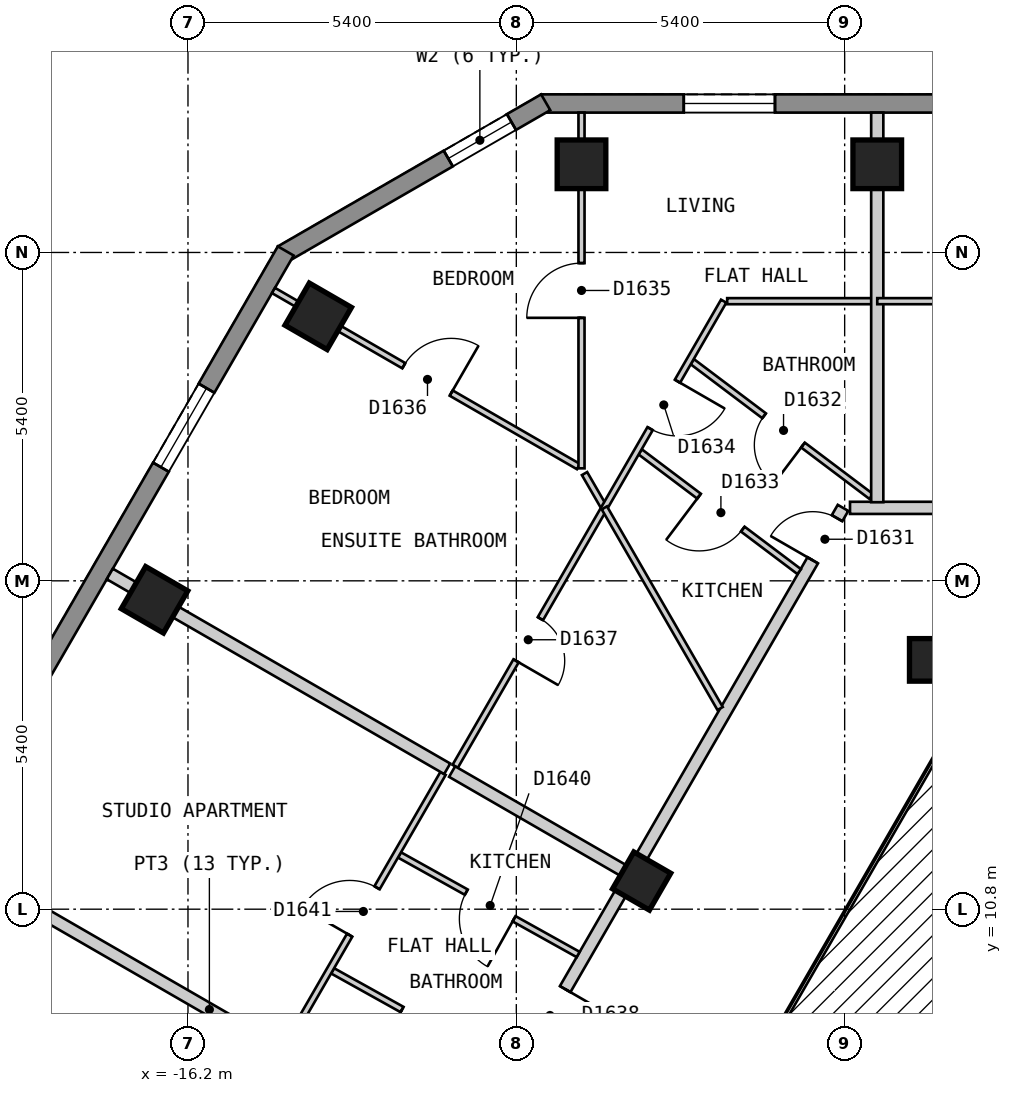
"""IFC4 building model, lengths in metres.
Left out: names, types, materials, properties, quantities, classifications, styles, units other than length and angle.
Written with IfcOpenShell. Run it as: python <this file> out.ifc"""

import sys

from ifc_helpers import new_model, si_unit, direction, frame, frame_2d, origin, origin_2d, place, context, subcontext, project, spatial, polyline, rectangle, outline, extrude, element, fill, save


model = new_model("IFC4")
c1 = context("Model", 3, precision=1e-05, world=origin(), true_north=direction((0.0, 1.0)))
c2 = subcontext(c1, "Body", "Model", "MODEL_VIEW")
j1 = project(units=[si_unit("LENGTHUNIT", "METRE"), si_unit("PLANEANGLEUNIT", "RADIAN")], contexts=[c1])
p1 = place(None, origin())
s1 = spatial("IfcSite", under=j1, at=p1, CompositionType="ELEMENT")
p2 = place(p1, origin())
s2 = spatial("IfcBuilding", under=s1, at=p2, CompositionType="ELEMENT")
p3 = place(p2, frame((0.0, 0.0, 163.2)))
s3 = spatial("IfcBuildingStorey", under=s2, at=p3, CompositionType="ELEMENT", Elevation=163.2)
for number, where, z_axis, x_axis in (
    (1, (-4.864, 23.05, 0.0), (0.0, 0.0, 1.0), (-1.0, 0.0, 0.0)),
    (2, (-9.728, 23.05, 0.0), (0.0, 0.0, 1.0), (-1.0, 0.0, 0.0)),
    (3, (-14.058, 20.55, 0.0), (0.0, 0.0, 1.0), (-0.5, -0.866, 0.0)),
    (4, (-16.75, 15.888, 0.0), (0.0, 0.0, 1.0), (-0.5, -0.866, 0.0)),
):
    element("IfcColumn", number, at=place(p3, frame(where, z_axis=z_axis, x_axis=x_axis)), inside=s3, PredefinedType="COLUMN", context=c2, shape_type="SweptSolid", body=[
        extrude(rectangle(XDim=0.8, YDim=0.8, at=origin_2d()), origin(), (0.0, 0.0, 1.0), 3.0),
    ])
for number, where, z_axis, x_axis in (
    (5, (-3.984, 14.9, 0.0), (0.0, 0.0, 1.0), (1.0, 0.0, 0.0)),
    (6, (-8.739, 11.263, 0.0), (0.0, 0.0, 1.0), (-0.5, -0.866, 0.0)),
):
    element("IfcColumn", number, at=place(p3, frame(where, z_axis=z_axis, x_axis=x_axis)), inside=s3, PredefinedType="COLUMN", context=c2, shape_type="SweptSolid", body=[
        extrude(rectangle(XDim=0.7, YDim=0.7, at=origin_2d()), origin(), (0.0, 0.0, 1.0), 3.0),
    ])
p4 = place(p3, frame((10.392, 24.05, 0.0), z_axis=(0.0, 0.0, 1.0), x_axis=(-1.0, 0.0, 0.0)))
e7 = element("IfcWall", 7, at=p4, inside=s3, PredefinedType="SOLIDWALL", context=c2, shape_type="SweptSolid", body=[
    extrude(outline(polyline([(0.0, -0.15), (20.784, -0.15), (20.704, 0.15), (0.08, 0.15), (0.0, -0.15)])), origin(), (0.0, 0.0, 1.0), 2.7),
])
p5 = place(p4, frame((2.346, 0.0, 0.15)))
e8 = element("IfcOpeningElement", 8, at=p5, cuts=e7, PredefinedType="OPENING", context=c2, shape_type="SweptSolid", body=[
    extrude(rectangle(XDim=1.5, YDim=2.1, at=frame_2d((0.75, 1.05))), frame((0.0, 0.16, 0.0), z_axis=(0.0, -1.0, 0.0), x_axis=(1.0, 0.0, 0.0)), (0.0, 0.0, 1.0), 0.32),
])
p6 = place(p4, frame((7.21, 0.0, 0.15)))
e9 = element("IfcOpeningElement", 9, at=p6, cuts=e7, PredefinedType="OPENING", context=c2, shape_type="SweptSolid", body=[
    extrude(rectangle(XDim=1.5, YDim=2.1, at=frame_2d((0.75, 1.05))), frame((0.0, 0.16, 0.0), z_axis=(0.0, -1.0, 0.0), x_axis=(1.0, 0.0, 0.0)), (0.0, 0.0, 1.0), 0.32),
])
p7 = place(p4, frame((12.074, 0.0, 0.15)))
e10 = element("IfcOpeningElement", 10, at=p7, cuts=e7, PredefinedType="OPENING", context=c2, shape_type="SweptSolid", body=[
    extrude(rectangle(XDim=1.5, YDim=2.1, at=frame_2d((0.75, 1.05))), frame((0.0, 0.16, 0.0), z_axis=(0.0, -1.0, 0.0), x_axis=(1.0, 0.0, 0.0)), (0.0, 0.0, 1.0), 0.32),
])
p8 = place(p4, frame((16.938, 0.0, 0.15)))
e11 = element("IfcOpeningElement", 11, at=p8, cuts=e7, PredefinedType="OPENING", context=c2, shape_type="SweptSolid", body=[
    extrude(rectangle(XDim=1.5, YDim=2.1, at=frame_2d((0.75, 1.05))), frame((0.0, 0.16, 0.0), z_axis=(0.0, -1.0, 0.0), x_axis=(1.0, 0.0, 0.0)), (0.0, 0.0, 1.0), 0.32),
])
p9 = place(p3, frame((-10.317, 24.07, 0.0), z_axis=(0.0, 0.0, 1.0), x_axis=(-0.866022959057, -0.500004234368, 0.0)))
e12 = element("IfcWall", 12, at=p9, inside=s3, PredefinedType="SOLIDWALL", context=c2, shape_type="SweptSolid", body=[
    extrude(outline(polyline([(0.0, -0.15), (5.0, -0.15), (4.92, 0.15), (0.08, 0.15), (0.0, -0.15)])), origin(), (0.0, 0.0, 1.0), 2.7),
])
p10 = place(p9, frame((0.65, 0.0, 0.15)))
e13 = element("IfcOpeningElement", 13, at=p10, cuts=e12, PredefinedType="OPENING", context=c2, shape_type="SweptSolid", body=[
    extrude(rectangle(XDim=1.2, YDim=2.1, at=frame_2d((0.6, 1.05))), frame((0.0, 0.16, 0.0), z_axis=(0.0, -1.0, 0.0), x_axis=(1.0, 0.0, 0.0)), (0.0, 0.0, 1.0), 0.32),
])
p11 = place(p3, frame((-14.592, 21.625, 0.0), z_axis=(0.0, 0.0, 1.0), x_axis=(-0.500010537973, -0.866019319597, 0.0)))
e14 = element("IfcWall", 14, at=p11, inside=s3, PredefinedType="SOLIDWALL", context=c2, shape_type="SweptSolid", body=[
    extrude(outline(polyline([(0.0, -0.15), (22.863, -0.15), (22.783, 0.15), (0.08, 0.15), (0.0, -0.15)])), origin(), (0.0, 0.0, 1.0), 2.7),
])
p12 = place(p11, frame((2.606, 0.0, 0.15)))
e15 = element("IfcOpeningElement", 15, at=p12, cuts=e14, PredefinedType="OPENING", context=c2, shape_type="SweptSolid", body=[
    extrude(rectangle(XDim=1.5, YDim=2.1, at=frame_2d((0.75, 1.05))), frame((0.0, 0.16, 0.0), z_axis=(0.0, -1.0, 0.0), x_axis=(1.0, 0.0, 0.0)), (0.0, 0.0, 1.0), 0.32),
])
p13 = place(p11, frame((7.99, 0.0, 0.15)))
e16 = element("IfcOpeningElement", 16, at=p13, cuts=e14, PredefinedType="OPENING", context=c2, shape_type="SweptSolid", body=[
    extrude(rectangle(XDim=1.5, YDim=2.1, at=frame_2d((0.75, 1.05))), frame((0.0, 0.16, 0.0), z_axis=(0.0, -1.0, 0.0), x_axis=(1.0, 0.0, 0.0)), (0.0, 0.0, 1.0), 0.32),
])
p14 = place(p11, frame((13.373, 0.0, 0.15)))
e17 = element("IfcOpeningElement", 17, at=p14, cuts=e14, PredefinedType="OPENING", context=c2, shape_type="SweptSolid", body=[
    extrude(rectangle(XDim=1.5, YDim=2.1, at=frame_2d((0.75, 1.05))), frame((0.0, 0.16, 0.0), z_axis=(0.0, -1.0, 0.0), x_axis=(1.0, 0.0, 0.0)), (0.0, 0.0, 1.0), 0.32),
])
p15 = place(p11, frame((18.758, 0.0, 0.15)))
e18 = element("IfcOpeningElement", 18, at=p15, cuts=e14, PredefinedType="OPENING", context=c2, shape_type="SweptSolid", body=[
    extrude(rectangle(XDim=1.5, YDim=2.1, at=frame_2d((0.75, 1.05))), frame((0.0, 0.16, 0.0), z_axis=(0.0, -1.0, 0.0), x_axis=(1.0, 0.0, 0.0)), (0.0, 0.0, 1.0), 0.32),
])
p16 = place(p3, frame((-5.312, 17.4, 0.0), z_axis=(0.0, 0.0, 1.0), x_axis=(1.0, 0.0, 0.0)))
e19 = element("IfcWall", 19, at=p16, inside=s3, PredefinedType="PARTITIONING", context=c2, shape_type="SweptSolid", body=[
    extrude(rectangle(XDim=10.738, YDim=0.2, at=frame_2d((5.369, 0.0))), origin(), (0.0, 0.0, 1.0), 2.7),
])
p17 = place(p16, frame((7.294, 0.0, 0.0)))
e20 = element("IfcOpeningElement", 20, at=p17, cuts=e19, PredefinedType="OPENING", context=c2, shape_type="SweptSolid", body=[
    extrude(rectangle(XDim=0.9, YDim=2.1, at=frame_2d((0.45, 1.05))), frame((0.0, 0.11, 0.0), z_axis=(0.0, -1.0, 0.0), x_axis=(1.0, 0.0, 0.0)), (0.0, 0.0, 1.0), 0.22),
])
p18 = place(p3, frame((-10.771, 8.144, 0.0), z_axis=(0.0, 0.0, 1.0), x_axis=(0.500008507724, 0.866020491792, 0.0)))
e21 = element("IfcWall", 21, at=p18, inside=s3, PredefinedType="PARTITIONING", context=c2, shape_type="SweptSolid", body=[
    extrude(rectangle(XDim=10.688, YDim=0.2, at=frame_2d((5.344, 0.0))), origin(), (0.0, 0.0, 1.0), 2.7),
])
p19 = place(p18, frame((9.692, 0.0, 0.0)))
e22 = element("IfcOpeningElement", 22, at=p19, cuts=e21, PredefinedType="OPENING", context=c2, shape_type="SweptSolid", body=[
    extrude(rectangle(XDim=0.8, YDim=2.1, at=frame_2d((0.4, 1.05))), frame((0.0, 0.11, 0.0), z_axis=(0.0, -1.0, 0.0), x_axis=(1.0, 0.0, 0.0)), (0.0, 0.0, 1.0), 0.22),
])
p20 = place(p18, frame((0.549, 0.0, 0.0)))
e23 = element("IfcOpeningElement", 23, at=p20, cuts=e21, PredefinedType="OPENING", context=c2, shape_type="SweptSolid", body=[
    extrude(rectangle(XDim=1.0, YDim=2.1, at=frame_2d((0.5, 1.05))), frame((0.0, 0.11, 0.0), z_axis=(0.0, -1.0, 0.0), x_axis=(1.0, 0.0, 0.0)), (0.0, 0.0, 1.0), 0.22),
])
p21 = place(p3, frame((-9.678, 17.964, 0.0), z_axis=(0.0, 0.0, 1.0), x_axis=(0.500208928872, -0.865904745036, 0.0)))
e24 = element("IfcWall", 24, at=p21, inside=s3, PredefinedType="PARTITIONING", context=c2, shape_type="SweptSolid", body=[
    extrude(rectangle(XDim=0.652, YDim=0.1, at=frame_2d((0.326, 0.0))), origin(), (0.0, 0.0, 1.0), 2.7),
])
p22 = place(p3, frame((-12.721, 11.692, 0.0), z_axis=(0.0, 0.0, 1.0), x_axis=(0.873557394398, -0.486721150859, 0.0)))
e25 = element("IfcWall", 25, at=p22, inside=s3, PredefinedType="PARTITIONING", context=c2, shape_type="SweptSolid", body=[
    extrude(rectangle(XDim=3.363, YDim=0.1, at=frame_2d((1.682, 0.0))), origin(), (0.0, 0.0, 1.0), 2.7),
])
p23 = place(p22, frame((1.257, 0.0, 0.0)))
e26 = element("IfcOpeningElement", 26, at=p23, cuts=e25, PredefinedType="OPENING", context=c2, shape_type="SweptSolid", body=[
    extrude(rectangle(XDim=0.9, YDim=2.1, at=frame_2d((0.45, 1.05))), frame((0.0, 0.06, 0.0), z_axis=(0.0, -1.0, 0.0), x_axis=(1.0, 0.0, 0.0)), (0.0, 0.0, 1.0), 0.12),
])
p24 = place(p3, frame((-13.821, 9.786, 0.0), z_axis=(0.0, 0.0, 1.0), x_axis=(0.873644620966, -0.486564565353, 0.0)))
e27 = element("IfcWall", 27, at=p24, inside=s3, PredefinedType="PARTITIONING", context=c2, shape_type="SweptSolid", body=[
    extrude(rectangle(XDim=3.463, YDim=0.1, at=frame_2d((1.731, 0.0))), origin(), (0.0, 0.0, 1.0), 2.7),
])
p25 = place(p24, frame((1.307, 0.0, 0.0)))
e28 = element("IfcOpeningElement", 28, at=p25, cuts=e27, PredefinedType="OPENING", context=c2, shape_type="SweptSolid", body=[
    extrude(rectangle(XDim=0.8, YDim=2.1, at=frame_2d((0.4, 1.05))), frame((0.0, 0.06, 0.0), z_axis=(0.0, -1.0, 0.0), x_axis=(1.0, 0.0, 0.0)), (0.0, 0.0, 1.0), 0.12),
])
p26 = place(p3, frame((-14.794, 20.975, 0.0), z_axis=(0.0, 0.0, 1.0), x_axis=(0.866019221245, -0.500010708319, 0.0)))
e29 = element("IfcWall", 29, at=p26, inside=s3, PredefinedType="PARTITIONING", context=c2, shape_type="SweptSolid", body=[
    extrude(rectangle(XDim=5.792, YDim=0.1, at=frame_2d((2.896, 0.0))), origin(), (0.0, 0.0, 1.0), 2.7),
])
p27 = place(p26, frame((2.475, 0.0, 0.0)))
e30 = element("IfcOpeningElement", 30, at=p27, cuts=e29, PredefinedType="OPENING", context=c2, shape_type="SweptSolid", body=[
    extrude(rectangle(XDim=0.9, YDim=2.1, at=frame_2d((0.45, 1.05))), frame((0.0, 0.06, 0.0), z_axis=(0.0, -1.0, 0.0), x_axis=(1.0, 0.0, 0.0)), (0.0, 0.0, 1.0), 0.12),
])
p28 = place(p3, frame((-8.763, 18.321, 0.0), z_axis=(0.0, 0.0, 1.0), x_axis=(0.798861914713, -0.601514456369, 0.0)))
e31 = element("IfcWall", 31, at=p28, inside=s3, PredefinedType="PARTITIONING", context=c2, shape_type="SweptSolid", body=[
    extrude(rectangle(XDim=3.273, YDim=0.1, at=frame_2d((1.637, 0.0))), origin(), (0.0, 0.0, 1.0), 2.7),
])
p29 = place(p28, frame((1.212, 0.0, 0.0)))
e32 = element("IfcOpeningElement", 32, at=p29, cuts=e31, PredefinedType="OPENING", context=c2, shape_type="SweptSolid", body=[
    extrude(rectangle(XDim=0.9, YDim=2.1, at=frame_2d((0.45, 1.05))), frame((0.0, 0.06, 0.0), z_axis=(0.0, -1.0, 0.0), x_axis=(1.0, 0.0, 0.0)), (0.0, 0.0, 1.0), 0.12),
])
p30 = place(p3, frame((-7.906, 19.804, 0.0), z_axis=(0.0, 0.0, 1.0), x_axis=(0.798741470056, -0.60167438371, 0.0)))
e33 = element("IfcWall", 33, at=p30, inside=s3, PredefinedType="PARTITIONING", context=c2, shape_type="SweptSolid", body=[
    extrude(rectangle(XDim=3.683, YDim=0.1, at=frame_2d((1.842, 0.0))), origin(), (0.0, 0.0, 1.0), 2.7),
])
p31 = place(p30, frame((1.479, 0.0, 0.0)))
e34 = element("IfcOpeningElement", 34, at=p31, cuts=e33, PredefinedType="OPENING", context=c2, shape_type="SweptSolid", body=[
    extrude(rectangle(XDim=0.8, YDim=2.1, at=frame_2d((0.4, 1.05))), frame((0.0, 0.06, 0.0), z_axis=(0.0, -1.0, 0.0), x_axis=(1.0, 0.0, 0.0)), (0.0, 0.0, 1.0), 0.12),
])
p32 = place(p3, frame((-7.332, 20.799, 0.0), z_axis=(0.0, 0.0, 1.0), x_axis=(1.0, 0.0, 0.0)))
e35 = element("IfcWall", 35, at=p32, inside=s3, PredefinedType="PARTITIONING", context=c2, shape_type="SweptSolid", body=[
    extrude(rectangle(XDim=2.468, YDim=0.1, at=frame_2d((1.234, 0.0))), origin(), (0.0, 0.0, 1.0), 2.7),
])
p33 = place(p3, frame((-11.806, 13.149, 0.0), z_axis=(0.0, 0.0, 1.0), x_axis=(0.499932199895, 0.866064544655, 0.0)))
e36 = element("IfcWall", 36, at=p33, inside=s3, PredefinedType="PARTITIONING", context=c2, shape_type="SweptSolid", body=[
    extrude(rectangle(XDim=8.833, YDim=0.1, at=frame_2d((4.417, 0.0))), origin(), (0.0, 0.0, 1.0), 2.7),
])
p34 = place(p33, frame((6.413, 0.0, 0.0)))
e37 = element("IfcOpeningElement", 37, at=p34, cuts=e36, PredefinedType="OPENING", context=c2, shape_type="SweptSolid", body=[
    extrude(rectangle(XDim=0.9, YDim=2.1, at=frame_2d((0.45, 1.05))), frame((0.0, 0.06, 0.0), z_axis=(0.0, -1.0, 0.0), x_axis=(1.0, 0.0, 0.0)), (0.0, 0.0, 1.0), 0.12),
])
p35 = place(p33, frame((2.004, 0.0, 0.0)))
e38 = element("IfcOpeningElement", 38, at=p35, cuts=e36, PredefinedType="OPENING", context=c2, shape_type="SweptSolid", body=[
    extrude(rectangle(XDim=0.8, YDim=2.1, at=frame_2d((0.4, 1.05))), frame((0.0, 0.06, 0.0), z_axis=(0.0, -1.0, 0.0), x_axis=(1.0, 0.0, 0.0)), (0.0, 0.0, 1.0), 0.12),
])
p36 = place(p3, frame((-14.597, 8.543, 0.0), z_axis=(0.0, 0.0, 1.0), x_axis=(0.499962957901, 0.866046788994, 0.0)))
e39 = element("IfcWall", 39, at=p36, inside=s3, PredefinedType="PARTITIONING", context=c2, shape_type="SweptSolid", body=[
    extrude(rectangle(XDim=5.185, YDim=0.1, at=frame_2d((2.592, 0.0))), origin(), (0.0, 0.0, 1.0), 2.7),
])
p37 = place(p36, frame((2.113, 0.0, 0.0)))
e40 = element("IfcOpeningElement", 40, at=p37, cuts=e39, PredefinedType="OPENING", context=c2, shape_type="SweptSolid", body=[
    extrude(rectangle(XDim=0.9, YDim=2.1, at=frame_2d((0.45, 1.05))), frame((0.0, 0.06, 0.0), z_axis=(0.0, -1.0, 0.0), x_axis=(1.0, 0.0, 0.0)), (0.0, 0.0, 1.0), 0.12),
])
p38 = place(p3, frame((-9.728, 18.05, 0.0), z_axis=(0.0, 0.0, 1.0), x_axis=(0.0, 1.0, 0.0)))
e41 = element("IfcWall", 41, at=p38, inside=s3, PredefinedType="PARTITIONING", context=c2, shape_type="SweptSolid", body=[
    extrude(rectangle(XDim=5.85, YDim=0.1, at=frame_2d((2.925, 0.0))), origin(), (0.0, 0.0, 1.0), 2.7),
])
p39 = place(p38, frame((2.475, 0.0, 0.0)))
e42 = element("IfcOpeningElement", 42, at=p39, cuts=e41, PredefinedType="OPENING", context=c2, shape_type="SweptSolid", body=[
    extrude(rectangle(XDim=0.9, YDim=2.1, at=frame_2d((0.45, 1.05))), frame((0.0, 0.06, 0.0), z_axis=(0.0, -1.0, 0.0), x_axis=(1.0, 0.0, 0.0)), (0.0, 0.0, 1.0), 0.12),
])
p40 = place(p3, frame((-20.178, 11.65, 0.0), z_axis=(0.0, 0.0, 1.0), x_axis=(0.866016855193, -0.500014806302, 0.0)))
e43 = element("IfcWall", 43, at=p40, inside=s3, PredefinedType="PARTITIONING", context=c2, shape_type="SweptSolid", body=[
    extrude(rectangle(XDim=10.0, YDim=0.2, at=frame_2d((5.0, 0.0))), origin(), (0.0, 0.0, 1.0), 2.7),
])
p41 = place(p3, frame((-17.486, 16.313, 0.0), z_axis=(0.0, 0.0, 1.0), x_axis=(0.866002210665, -0.500040169509, 0.0)))
e44 = element("IfcWall", 44, at=p41, inside=s3, PredefinedType="PARTITIONING", context=c2, shape_type="SweptSolid", body=[
    extrude(rectangle(XDim=6.408, YDim=0.2, at=frame_2d((3.204, 0.0))), origin(), (0.0, 0.0, 1.0), 2.7),
])
p42 = place(p3, frame((-11.856, 13.063, 0.0), z_axis=(0.0, 0.0, 1.0), x_axis=(0.865966208357, -0.500102515474, 0.0)))
e45 = element("IfcWall", 45, at=p42, inside=s3, PredefinedType="PARTITIONING", context=c2, shape_type="SweptSolid", body=[
    extrude(rectangle(XDim=3.299, YDim=0.2, at=frame_2d((1.649, 0.0))), origin(), (0.0, 0.0, 1.0), 2.7),
])
p43 = place(p3, frame((-4.864, 17.493, 0.0), z_axis=(0.0, 0.0, 1.0), x_axis=(0.0, 1.0, 0.0)))
e46 = element("IfcWall", 46, at=p43, inside=s3, PredefinedType="PARTITIONING", context=c2, shape_type="SweptSolid", body=[
    extrude(rectangle(XDim=6.407, YDim=0.2, at=frame_2d((3.204, 0.0))), origin(), (0.0, 0.0, 1.0), 2.7),
])
p44 = place(p3, frame((-9.352, 17.4, 0.0), z_axis=(0.0, 0.0, 1.0), x_axis=(0.499785326313, -0.866149310225, 0.0)))
e47 = element("IfcWall", 47, at=p44, inside=s3, PredefinedType="PARTITIONING", context=c2, shape_type="SweptSolid", body=[
    extrude(rectangle(XDim=3.81, YDim=0.1, at=frame_2d((1.905, 0.0))), origin(), (0.0, 0.0, 1.0), 2.7),
])
p45 = place(p3, frame((-4.864, 20.799, 0.0), z_axis=(0.0, 0.0, 1.0), x_axis=(1.0, 0.0, 0.0)))
e48 = element("IfcWall", 48, at=p45, inside=s3, PredefinedType="PARTITIONING", context=c2, shape_type="SweptSolid", body=[
    extrude(rectangle(XDim=4.814, YDim=0.1, at=frame_2d((2.407, 0.0))), origin(), (0.0, 0.0, 1.0), 2.7),
])
p46 = place(p45, frame((2.032, 0.0, 0.0)))
e49 = element("IfcOpeningElement", 49, at=p46, cuts=e48, PredefinedType="OPENING", context=c2, shape_type="SweptSolid", body=[
    extrude(rectangle(XDim=0.8, YDim=2.1, at=frame_2d((0.4, 1.05))), frame((0.0, 0.06, 0.0), z_axis=(0.0, -1.0, 0.0), x_axis=(1.0, 0.0, 0.0)), (0.0, 0.0, 1.0), 0.12),
])
p47 = place(p8, origin())
e50 = element("IfcWindow", 50, at=p47, inside=s3, PartitioningType="SINGLE_PANEL", PredefinedType="WINDOW", context=c2, shape_type="SweptSolid", body=[
    extrude(rectangle(XDim=1.5, YDim=2.1, at=frame_2d((0.75, 1.05))), frame((0.0, 0.03, 0.0), z_axis=(0.0, -1.0, 0.0), x_axis=(1.0, 0.0, 0.0)), (0.0, 0.0, 1.0), 0.06),
])
fill(e11, e50)
p48 = place(p10, origin())
e51 = element("IfcWindow", 51, at=p48, inside=s3, PartitioningType="SINGLE_PANEL", PredefinedType="WINDOW", context=c2, shape_type="SweptSolid", body=[
    extrude(rectangle(XDim=1.2, YDim=2.1, at=frame_2d((0.6, 1.05))), frame((0.0, 0.03, 0.0), z_axis=(0.0, -1.0, 0.0), x_axis=(1.0, 0.0, 0.0)), (0.0, 0.0, 1.0), 0.06),
])
fill(e13, e51)
p49 = place(p12, origin())
e52 = element("IfcWindow", 52, at=p49, inside=s3, PartitioningType="SINGLE_PANEL", PredefinedType="WINDOW", context=c2, shape_type="SweptSolid", body=[
    extrude(rectangle(XDim=1.5, YDim=2.1, at=frame_2d((0.75, 1.05))), frame((0.0, 0.03, 0.0), z_axis=(0.0, -1.0, 0.0), x_axis=(1.0, 0.0, 0.0)), (0.0, 0.0, 1.0), 0.06),
])
fill(e15, e52)
p50 = place(p19, origin())
e53 = element("IfcDoor", 53, at=p50, inside=s3, OperationType="SINGLE_SWING_LEFT", PredefinedType="DOOR", context=c2, shape_type="SweptSolid", body=[
    extrude(rectangle(XDim=0.8, YDim=2.1, at=frame_2d((0.4, 1.05))), frame((0.0, 0.025, 0.0), z_axis=(0.0, -1.0, 0.0), x_axis=(1.0, 0.0, 0.0)), (0.0, 0.0, 1.0), 0.05),
])
fill(e22, e53)
p51 = place(p31, origin())
e54 = element("IfcDoor", 54, at=p51, inside=s3, OperationType="SINGLE_SWING_RIGHT", PredefinedType="DOOR", context=c2, shape_type="SweptSolid", body=[
    extrude(rectangle(XDim=0.8, YDim=2.1, at=frame_2d((0.4, 1.05))), frame((0.0, 0.025, 0.0), z_axis=(0.0, -1.0, 0.0), x_axis=(1.0, 0.0, 0.0)), (0.0, 0.0, 1.0), 0.05),
])
fill(e34, e54)
p52 = place(p29, origin())
e55 = element("IfcDoor", 55, at=p52, inside=s3, OperationType="SINGLE_SWING_LEFT", PredefinedType="DOOR", context=c2, shape_type="SweptSolid", body=[
    extrude(rectangle(XDim=0.9, YDim=2.1, at=frame_2d((0.45, 1.05))), frame((0.0, 0.025, 0.0), z_axis=(0.0, -1.0, 0.0), x_axis=(1.0, 0.0, 0.0)), (0.0, 0.0, 1.0), 0.05),
])
fill(e32, e55)
p53 = place(p34, origin())
e56 = element("IfcDoor", 56, at=p53, inside=s3, OperationType="SINGLE_SWING_RIGHT", PredefinedType="DOOR", context=c2, shape_type="SweptSolid", body=[
    extrude(rectangle(XDim=0.9, YDim=2.1, at=frame_2d((0.45, 1.05))), frame((0.0, 0.025, 0.0), z_axis=(0.0, -1.0, 0.0), x_axis=(1.0, 0.0, 0.0)), (0.0, 0.0, 1.0), 0.05),
])
fill(e37, e56)
p54 = place(p39, origin())
e57 = element("IfcDoor", 57, at=p54, inside=s3, OperationType="SINGLE_SWING_LEFT", PredefinedType="DOOR", context=c2, shape_type="SweptSolid", body=[
    extrude(rectangle(XDim=0.9, YDim=2.1, at=frame_2d((0.45, 1.05))), frame((0.0, 0.025, 0.0), z_axis=(0.0, -1.0, 0.0), x_axis=(1.0, 0.0, 0.0)), (0.0, 0.0, 1.0), 0.05),
])
fill(e42, e57)
p55 = place(p27, origin())
e58 = element("IfcDoor", 58, at=p55, inside=s3, OperationType="SINGLE_SWING_RIGHT", PredefinedType="DOOR", context=c2, shape_type="SweptSolid", body=[
    extrude(rectangle(XDim=0.9, YDim=2.1, at=frame_2d((0.45, 1.05))), frame((0.0, 0.025, 0.0), z_axis=(0.0, -1.0, 0.0), x_axis=(1.0, 0.0, 0.0)), (0.0, 0.0, 1.0), 0.05),
])
fill(e30, e58)
p56 = place(p35, origin())
e59 = element("IfcDoor", 59, at=p56, inside=s3, OperationType="SINGLE_SWING_LEFT", PredefinedType="DOOR", context=c2, shape_type="SweptSolid", body=[
    extrude(rectangle(XDim=0.8, YDim=2.1, at=frame_2d((0.4, 1.05))), frame((0.0, 0.025, 0.0), z_axis=(0.0, -1.0, 0.0), x_axis=(1.0, 0.0, 0.0)), (0.0, 0.0, 1.0), 0.05),
])
fill(e38, e59)
p57 = place(p20, origin())
e60 = element("IfcDoor", 60, at=p57, inside=s3, OperationType="SINGLE_SWING_RIGHT", PredefinedType="DOOR", context=c2, shape_type="SweptSolid", body=[
    extrude(rectangle(XDim=1.0, YDim=2.1, at=frame_2d((0.5, 1.05))), frame((0.0, 0.025, 0.0), z_axis=(0.0, -1.0, 0.0), x_axis=(1.0, 0.0, 0.0)), (0.0, 0.0, 1.0), 0.05),
])
fill(e23, e60)
p58 = place(p25, origin())
e61 = element("IfcDoor", 61, at=p58, inside=s3, OperationType="SINGLE_SWING_LEFT", PredefinedType="DOOR", context=c2, shape_type="SweptSolid", body=[
    extrude(rectangle(XDim=0.8, YDim=2.1, at=frame_2d((0.4, 1.05))), frame((0.0, 0.025, 0.0), z_axis=(0.0, -1.0, 0.0), x_axis=(1.0, 0.0, 0.0)), (0.0, 0.0, 1.0), 0.05),
])
fill(e28, e61)
p59 = place(p23, origin())
e62 = element("IfcDoor", 62, at=p59, inside=s3, OperationType="SINGLE_SWING_RIGHT", PredefinedType="DOOR", context=c2, shape_type="SweptSolid", body=[
    extrude(rectangle(XDim=0.9, YDim=2.1, at=frame_2d((0.45, 1.05))), frame((0.0, 0.025, 0.0), z_axis=(0.0, -1.0, 0.0), x_axis=(1.0, 0.0, 0.0)), (0.0, 0.0, 1.0), 0.05),
])
fill(e26, e62)
p60 = place(p37, origin())
e63 = element("IfcDoor", 63, at=p60, inside=s3, OperationType="SINGLE_SWING_LEFT", PredefinedType="DOOR", context=c2, shape_type="SweptSolid", body=[
    extrude(rectangle(XDim=0.9, YDim=2.1, at=frame_2d((0.45, 1.05))), frame((0.0, 0.025, 0.0), z_axis=(0.0, -1.0, 0.0), x_axis=(1.0, 0.0, 0.0)), (0.0, 0.0, 1.0), 0.05),
])
fill(e40, e63)
save(model, sys.argv[1])
